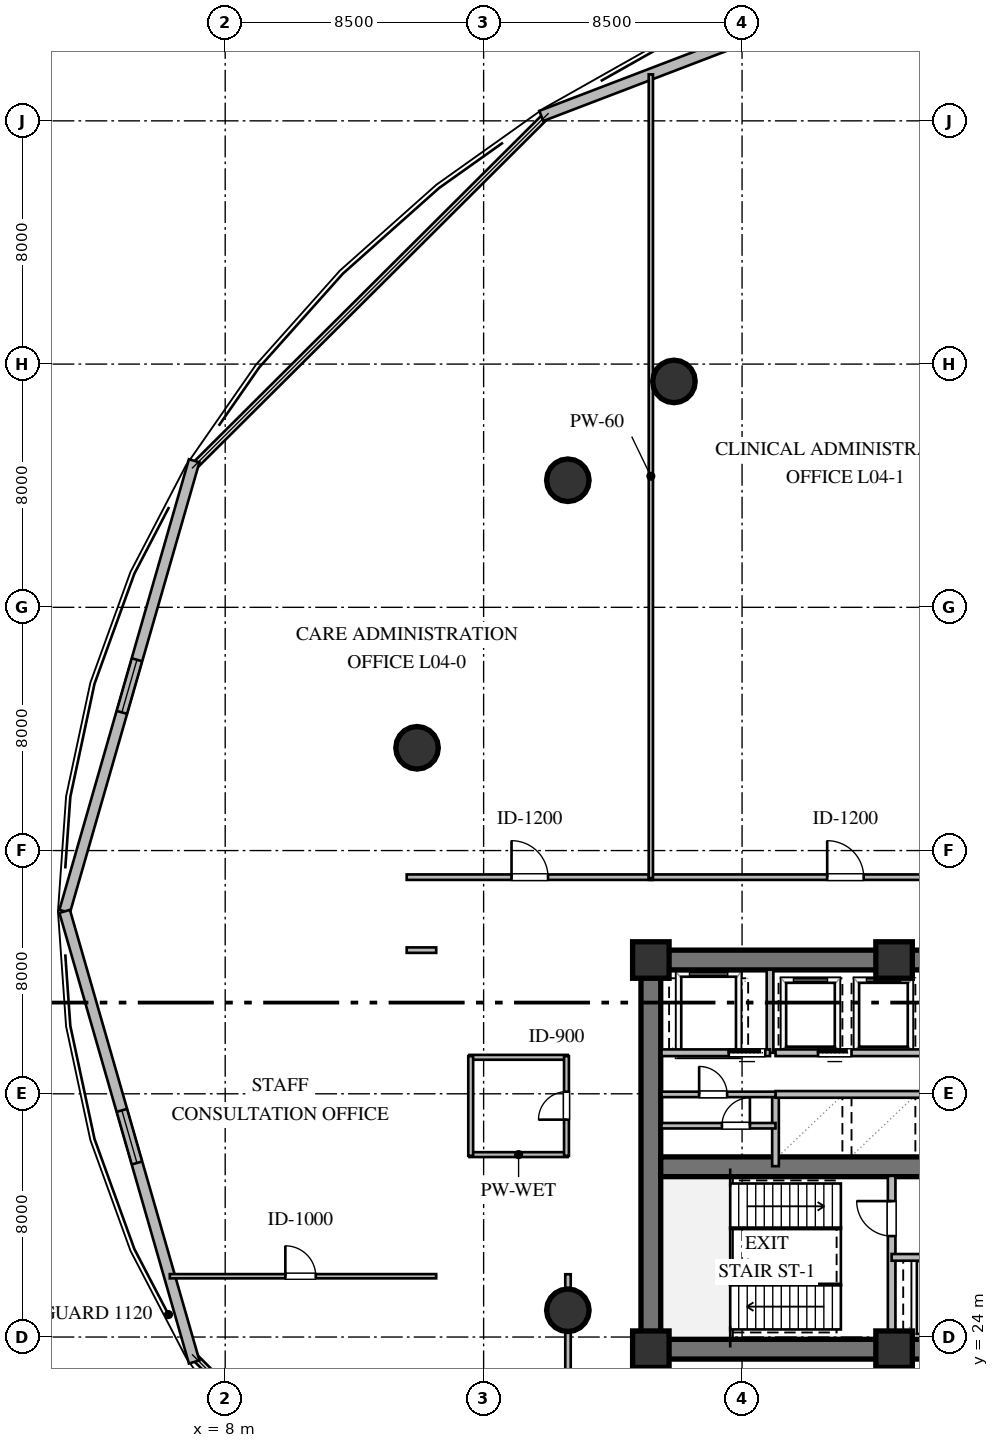
"""IFC4 building model, lengths in metres.
Left out: names, types, materials, properties, quantities, classifications, styles, units other than length and angle.
Written with IfcOpenShell. Run it as: python <this file> out.ifc"""

import sys

from ifc_helpers import new_model, si_unit, direction, frame, frame_2d, origin, origin_2d, place, context, subcontext, project, spatial, rectangle, circle, extrude, element, fill, save


model = new_model("IFC4")
c1 = context("Model", 3, precision=1e-05, world=origin(), true_north=direction((0.0, 1.0)))
c2 = subcontext(c1, "Body", "Model", "MODEL_VIEW")
j1 = project(units=[si_unit("LENGTHUNIT", "METRE"), si_unit("PLANEANGLEUNIT", "RADIAN")], contexts=[c1])
p1 = place(None, origin())
s1 = spatial("IfcSite", under=j1, at=p1, CompositionType="ELEMENT")
p2 = place(p1, origin())
s2 = spatial("IfcBuilding", under=s1, at=p2, CompositionType="ELEMENT")
p3 = place(p2, frame((0.0, 0.0, 19.2)))
s3 = spatial("IfcBuildingStorey", under=s2, at=p3, CompositionType="ELEMENT", Elevation=19.2)
for number, where, z_axis, x_axis in (
    (1, (21.675, 23.6, 0.0), (0.0, 0.0, 1.0), (1.0, 0.0, 0.0)),
    (2, (21.675, 36.4, 0.0), (0.0, 0.0, 1.0), (1.0, 0.0, 0.0)),
):
    element("IfcWall", number, at=place(p3, frame(where, z_axis=z_axis, x_axis=x_axis)), inside=s3, PredefinedType="SHEAR", context=c2, shape_type="SweptSolid", body=[
        extrude(rectangle(XDim=22.65, YDim=0.65, at=frame_2d((11.325, 0.0))), origin(), (0.0, 0.0, 1.0), 4.56),
    ])
p4 = place(p3, frame((22.0, 23.925, 0.0), z_axis=(0.0, 0.0, 1.0), x_axis=(0.0, 1.0, 0.0)))
e3 = element("IfcWall", 3, at=p4, inside=s3, PredefinedType="SHEAR", context=c2, shape_type="SweptSolid", body=[
    extrude(rectangle(XDim=12.15, YDim=0.65, at=frame_2d((6.075, 0.0))), origin(), (0.0, 0.0, 1.0), 4.56),
])
p5 = place(p3, frame((22.325, 29.6, 0.0), z_axis=(0.0, 0.0, 1.0), x_axis=(1.0, 0.0, 0.0)))
e4 = element("IfcWall", 4, at=p5, inside=s3, PredefinedType="SHEAR", context=c2, shape_type="SweptSolid", body=[
    extrude(rectangle(XDim=21.35, YDim=0.65, at=frame_2d((10.675, 0.0))), origin(), (0.0, 0.0, 1.0), 4.56),
])
p6 = place(p5, frame((12.125, 0.0, 0.0)))
e5 = element("IfcOpeningElement", 5, at=p6, cuts=e4, PredefinedType="OPENING", context=c2, shape_type="SweptSolid", body=[
    extrude(rectangle(XDim=1.15, YDim=2.1, at=frame_2d((0.575, 1.05))), frame((0.0, 0.335, 0.0), z_axis=(0.0, -1.0, 0.0), x_axis=(1.0, 0.0, 0.0)), (0.0, 0.0, 1.0), 0.67),
])
for number, where, z_axis, x_axis in (
    (6, (22.0, 23.6, 0.0), (0.0, 0.0, 1.0), (1.0, 0.0, 0.0)),
    (7, (30.0, 23.6, 0.0), (0.0, 0.0, 1.0), (1.0, 0.0, 0.0)),
    (8, (30.0, 36.4, 0.0), (0.0, 0.0, 1.0), (1.0, 0.0, 0.0)),
    (9, (22.0, 36.4, 0.0), (0.0, 0.0, 1.0), (1.0, 0.0, 0.0)),
):
    element("IfcColumn", number, at=place(p3, frame(where, z_axis=z_axis, x_axis=x_axis)), inside=s3, PredefinedType="COLUMN", context=c2, shape_type="SweptSolid", body=[
        extrude(rectangle(XDim=1.2, YDim=1.2, at=origin_2d()), origin(), (0.0, 0.0, 1.0), 4.8),
    ])
for number, where, z_axis, x_axis in (
    (10, (22.76, 55.43, 0.0), (0.0, 0.0, 1.0), (1.0, 0.0, 0.0)),
    (11, (19.27, 52.18, 0.0), (0.0, 0.0, 1.0), (1.0, 0.0, 0.0)),
    (12, (14.31, 43.38, 0.0), (0.0, 0.0, 1.0), (1.0, 0.0, 0.0)),
    (13, (19.27, 24.88, 0.0), (0.0, 0.0, 1.0), (1.0, 0.0, 0.0)),
):
    element("IfcColumn", number, at=place(p3, frame(where, z_axis=z_axis, x_axis=x_axis)), inside=s3, PredefinedType="COLUMN", context=c2, shape_type="SweptSolid", body=[
        extrude(circle(Radius=0.7, at=origin_2d()), origin(), (0.0, 0.0, 1.0), 4.8),
    ])
p7 = place(p3, frame((35.835, 70.831, 0.0), z_axis=(0.0, 0.0, 1.0), x_axis=(-0.934010262022, -0.357246176238, 0.0)))
e14 = element("IfcWall", 14, at=p7, inside=s3, PredefinedType="STANDARD", context=c2, shape_type="SweptSolid", body=[
    extrude(rectangle(XDim=18.671, YDim=0.36, at=frame_2d((9.335, 0.0))), origin(), (0.0, 0.0, 1.0), 4.56),
])
p8 = place(p7, frame((8.436, 0.0, 1.05)))
e15 = element("IfcOpeningElement", 15, at=p8, cuts=e14, PredefinedType="OPENING", context=c2, shape_type="SweptSolid", body=[
    extrude(rectangle(XDim=1.8, YDim=1.7, at=frame_2d((0.9, 0.85))), frame((0.0, 0.19, 0.0), z_axis=(0.0, -1.0, 0.0), x_axis=(1.0, 0.0, 0.0)), (0.0, 0.0, 1.0), 0.38),
])
p9 = place(p3, frame((6.979, 52.82, 0.0), z_axis=(0.0, 0.0, 1.0), x_axis=(-0.276203409751, -0.961099202186, 0.0)))
e16 = element("IfcWall", 16, at=p9, inside=s3, PredefinedType="STANDARD", context=c2, shape_type="SweptSolid", body=[
    extrude(rectangle(XDim=15.42, YDim=0.36, at=frame_2d((7.71, 0.0))), origin(), (0.0, 0.0, 1.0), 4.56),
])
p10 = place(p9, frame((6.81, 0.0, 1.05)))
e17 = element("IfcOpeningElement", 17, at=p10, cuts=e16, PredefinedType="OPENING", context=c2, shape_type="SweptSolid", body=[
    extrude(rectangle(XDim=1.8, YDim=1.7, at=frame_2d((0.9, 0.85))), frame((0.0, 0.19, 0.0), z_axis=(0.0, -1.0, 0.0), x_axis=(1.0, 0.0, 0.0)), (0.0, 0.0, 1.0), 0.38),
])
p11 = place(p3, frame((2.72, 38.0, 0.0), z_axis=(0.0, 0.0, 1.0), x_axis=(0.276203409751, -0.961099202186, 0.0)))
e18 = element("IfcWall", 18, at=p11, inside=s3, PredefinedType="STANDARD", context=c2, shape_type="SweptSolid", body=[
    extrude(rectangle(XDim=15.42, YDim=0.36, at=frame_2d((7.71, 0.0))), origin(), (0.0, 0.0, 1.0), 4.56),
])
p12 = place(p11, frame((6.81, 0.0, 1.05)))
e19 = element("IfcOpeningElement", 19, at=p12, cuts=e18, PredefinedType="OPENING", context=c2, shape_type="SweptSolid", body=[
    extrude(rectangle(XDim=1.8, YDim=1.7, at=frame_2d((0.9, 0.85))), frame((0.0, 0.19, 0.0), z_axis=(0.0, -1.0, 0.0), x_axis=(1.0, 0.0, 0.0)), (0.0, 0.0, 1.0), 0.38),
])
p13 = place(p3, frame((29.92, 23.9, 0.0), z_axis=(0.0, 0.0, 1.0), x_axis=(0.0, 1.0, 0.0)))
e20 = element("IfcWall", 20, at=p13, inside=s3, PredefinedType="SOLIDWALL", context=c2, shape_type="SweptSolid", body=[
    extrude(rectangle(XDim=5.4, YDim=0.25, at=frame_2d((2.7, 0.0))), origin(), (0.0, 0.0, 1.0), 4.56),
])
p14 = place(p13, frame((3.421, 0.0, 0.0)))
e21 = element("IfcOpeningElement", 21, at=p14, cuts=e20, PredefinedType="OPENING", context=c2, shape_type="SweptSolid", body=[
    extrude(rectangle(XDim=1.15, YDim=2.1, at=frame_2d((0.575, 1.05))), frame((0.0, 0.135, 0.0), z_axis=(0.0, -1.0, 0.0), x_axis=(1.0, 0.0, 0.0)), (0.0, 0.0, 1.0), 0.27),
])
p15 = place(p3, frame((29.92, 26.62, 0.0), z_axis=(0.0, 0.0, 1.0), x_axis=(1.0, 0.0, 0.0)))
e22 = element("IfcWall", 22, at=p15, inside=s3, PredefinedType="SOLIDWALL", context=c2, shape_type="SweptSolid", body=[
    extrude(rectangle(XDim=6.16, YDim=0.22, at=frame_2d((3.08, 0.0))), origin(), (0.0, 0.0, 1.0), 4.56),
])
p16 = place(p15, frame((0.99, 0.0, 0.0)))
e23 = element("IfcOpeningElement", 23, at=p16, cuts=e22, PredefinedType="OPENING", context=c2, shape_type="SweptSolid", body=[
    extrude(rectangle(XDim=1.1, YDim=2.1, at=frame_2d((0.55, 1.05))), frame((0.0, 0.12, 0.0), z_axis=(0.0, -1.0, 0.0), x_axis=(1.0, 0.0, 0.0)), (0.0, 0.0, 1.0), 0.24),
])
p17 = place(p15, frame((4.07, 0.0, 0.0)))
e24 = element("IfcOpeningElement", 24, at=p17, cuts=e22, PredefinedType="OPENING", context=c2, shape_type="SweptSolid", body=[
    extrude(rectangle(XDim=1.1, YDim=2.1, at=frame_2d((0.55, 1.05))), frame((0.0, 0.12, 0.0), z_axis=(0.0, -1.0, 0.0), x_axis=(1.0, 0.0, 0.0)), (0.0, 0.0, 1.0), 0.24),
])
p18 = place(p3, frame((25.92, 33.35, 0.0), z_axis=(0.0, 0.0, 1.0), x_axis=(0.0, 1.0, 0.0)))
e25 = element("IfcWall", 25, at=p18, inside=s3, PredefinedType="SOLIDWALL", context=c2, shape_type="SweptSolid", body=[
    extrude(rectangle(XDim=2.73, YDim=0.22, at=frame_2d((1.365, 0.0))), origin(), (0.0, 0.0, 1.0), 4.56),
])
p19 = place(p3, frame((22.35, 33.35, 0.0), z_axis=(0.0, 0.0, 1.0), x_axis=(1.0, 0.0, 0.0)))
e26 = element("IfcWall", 26, at=p19, inside=s3, PredefinedType="SOLIDWALL", context=c2, shape_type="SweptSolid", body=[
    extrude(rectangle(XDim=3.57, YDim=0.22, at=frame_2d((1.785, 0.0))), origin(), (0.0, 0.0, 1.0), 4.56),
])
p20 = place(p19, frame((2.213, 0.0, 0.0)))
e27 = element("IfcOpeningElement", 27, at=p20, cuts=e26, PredefinedType="OPENING", context=c2, shape_type="SweptSolid", body=[
    extrude(rectangle(XDim=1.2, YDim=2.1, at=frame_2d((0.6, 1.05))), frame((0.0, 0.12, 0.0), z_axis=(0.0, -1.0, 0.0), x_axis=(1.0, 0.0, 0.0)), (0.0, 0.0, 1.0), 0.24),
])
p21 = place(p3, frame((26.1, 29.62, 0.0), z_axis=(0.0, 0.0, 1.0), x_axis=(0.0, 1.0, 0.0)))
e28 = element("IfcWall", 28, at=p21, inside=s3, PredefinedType="SOLIDWALL", context=c2, shape_type="SweptSolid", body=[
    extrude(rectangle(XDim=2.36, YDim=0.22, at=frame_2d((1.18, 0.0))), origin(), (0.0, 0.0, 1.0), 4.56),
])
p22 = place(p3, frame((26.1, 31.98, 0.0), z_axis=(0.0, 0.0, 1.0), x_axis=(1.0, 0.0, 0.0)))
e29 = element("IfcWall", 29, at=p22, inside=s3, PredefinedType="SOLIDWALL", context=c2, shape_type="SweptSolid", body=[
    extrude(rectangle(XDim=7.8, YDim=0.22, at=frame_2d((3.9, 0.0))), origin(), (0.0, 0.0, 1.0), 4.56),
])
p23 = place(p3, frame((26.1, 33.35, 0.0), z_axis=(0.0, 0.0, 1.0), x_axis=(1.0, 0.0, 0.0)))
e30 = element("IfcWall", 30, at=p23, inside=s3, PredefinedType="SOLIDWALL", context=c2, shape_type="SweptSolid", body=[
    extrude(rectangle(XDim=7.8, YDim=0.22, at=frame_2d((3.9, 0.0))), origin(), (0.0, 0.0, 1.0), 4.56),
])
p24 = place(p23, frame((1.4, 0.0, 0.0)))
e31 = element("IfcOpeningElement", 31, at=p24, cuts=e30, PredefinedType="OPENING", context=c2, shape_type="SweptSolid", body=[
    extrude(rectangle(XDim=1.1, YDim=2.1, at=frame_2d((0.55, 1.05))), frame((0.0, 0.12, 0.0), z_axis=(0.0, -1.0, 0.0), x_axis=(1.0, 0.0, 0.0)), (0.0, 0.0, 1.0), 0.24),
])
p25 = place(p23, frame((5.066, 0.0, 0.0)))
e32 = element("IfcOpeningElement", 32, at=p25, cuts=e30, PredefinedType="OPENING", context=c2, shape_type="SweptSolid", body=[
    extrude(rectangle(XDim=1.1, YDim=2.1, at=frame_2d((0.55, 1.05))), frame((0.0, 0.12, 0.0), z_axis=(0.0, -1.0, 0.0), x_axis=(1.0, 0.0, 0.0)), (0.0, 0.0, 1.0), 0.24),
])
p26 = place(p3, frame((22.35, 30.95, 0.0), z_axis=(0.0, 0.0, 1.0), x_axis=(1.0, 0.0, 0.0)))
e33 = element("IfcWall", 33, at=p26, inside=s3, PredefinedType="PARTITIONING", context=c2, shape_type="SweptSolid", body=[
    extrude(rectangle(XDim=3.75, YDim=0.18, at=frame_2d((1.875, 0.0))), origin(), (0.0, 0.0, 1.0), 4.56),
])
p27 = place(p26, frame((1.988, 0.0, 0.0)))
e34 = element("IfcOpeningElement", 34, at=p27, cuts=e33, PredefinedType="OPENING", context=c2, shape_type="SweptSolid", body=[
    extrude(rectangle(XDim=0.92, YDim=2.1, at=frame_2d((0.46, 1.05))), frame((0.0, 0.1, 0.0), z_axis=(0.0, -1.0, 0.0), x_axis=(1.0, 0.0, 0.0)), (0.0, 0.0, 1.0), 0.2),
])
p28 = place(p3, frame((22.35, 31.98, 0.0), z_axis=(0.0, 0.0, 1.0), x_axis=(1.0, 0.0, 0.0)))
e35 = element("IfcWall", 35, at=p28, inside=s3, PredefinedType="PARTITIONING", context=c2, shape_type="SweptSolid", body=[
    extrude(rectangle(XDim=3.75, YDim=0.18, at=frame_2d((1.875, 0.0))), origin(), (0.0, 0.0, 1.0), 4.56),
])
p29 = place(p28, frame((1.238, 0.0, 0.0)))
e36 = element("IfcOpeningElement", 36, at=p29, cuts=e35, PredefinedType="OPENING", context=c2, shape_type="SweptSolid", body=[
    extrude(rectangle(XDim=0.92, YDim=2.1, at=frame_2d((0.46, 1.05))), frame((0.0, 0.1, 0.0), z_axis=(0.0, -1.0, 0.0), x_axis=(1.0, 0.0, 0.0)), (0.0, 0.0, 1.0), 0.2),
])
for number, where, z_axis, x_axis in (
    (37, (16.035, 30.0, 0.0), (0.0, 0.0, 1.0), (1.0, 0.0, 0.0)),
    (38, (16.035, 33.2, 0.0), (0.0, 0.0, 1.0), (1.0, 0.0, 0.0)),
):
    element("IfcWall", number, at=place(p3, frame(where, z_axis=z_axis, x_axis=x_axis)), inside=s3, PredefinedType="PLUMBINGWALL", context=c2, shape_type="SweptSolid", body=[
        extrude(rectangle(XDim=3.23, YDim=0.16, at=frame_2d((1.615, 0.0))), origin(), (0.0, 0.0, 1.0), 4.56),
    ])
p30 = place(p3, frame((16.075, 29.96, 0.0), z_axis=(0.0, 0.0, 1.0), x_axis=(0.0, 1.0, 0.0)))
e39 = element("IfcWall", 39, at=p30, inside=s3, PredefinedType="PLUMBINGWALL", context=c2, shape_type="SweptSolid", body=[
    extrude(rectangle(XDim=3.28, YDim=0.16, at=frame_2d((1.64, 0.0))), origin(), (0.0, 0.0, 1.0), 4.56),
])
p31 = place(p3, frame((19.225, 29.96, 0.0), z_axis=(0.0, 0.0, 1.0), x_axis=(0.0, 1.0, 0.0)))
e40 = element("IfcWall", 40, at=p31, inside=s3, PredefinedType="PLUMBINGWALL", context=c2, shape_type="SweptSolid", body=[
    extrude(rectangle(XDim=3.28, YDim=0.16, at=frame_2d((1.64, 0.0))), origin(), (0.0, 0.0, 1.0), 4.56),
])
p32 = place(p31, frame((1.19, 0.0, 0.0)))
e41 = element("IfcOpeningElement", 41, at=p32, cuts=e40, PredefinedType="OPENING", context=c2, shape_type="SweptSolid", body=[
    extrude(rectangle(XDim=0.92, YDim=2.1, at=frame_2d((0.46, 1.05))), frame((0.0, 0.09, 0.0), z_axis=(0.0, -1.0, 0.0), x_axis=(1.0, 0.0, 0.0)), (0.0, 0.0, 1.0), 0.18),
])
p33 = place(p3, frame((13.97, 39.125, 0.0), z_axis=(0.0, 0.0, 1.0), x_axis=(1.0, 0.0, 0.0)))
e42 = element("IfcWall", 42, at=p33, inside=s3, PredefinedType="PARTITIONING", context=c2, shape_type="SweptSolid", body=[
    extrude(rectangle(XDim=8.095, YDim=0.18, at=frame_2d((4.047, 0.0))), origin(), (0.0, 0.0, 1.0), 4.56),
])
p34 = place(p33, frame((3.448, 0.0, 0.0)))
e43 = element("IfcOpeningElement", 43, at=p34, cuts=e42, PredefinedType="OPENING", context=c2, shape_type="SweptSolid", body=[
    extrude(rectangle(XDim=1.2, YDim=2.15, at=frame_2d((0.6, 1.075))), frame((0.0, 0.1, 0.0), z_axis=(0.0, -1.0, 0.0), x_axis=(1.0, 0.0, 0.0)), (0.0, 0.0, 1.0), 0.2),
])
p35 = place(p3, frame((21.935, 39.125, 0.0), z_axis=(0.0, 0.0, 1.0), x_axis=(1.0, 0.0, 0.0)))
e44 = element("IfcWall", 44, at=p35, inside=s3, PredefinedType="PARTITIONING", context=c2, shape_type="SweptSolid", body=[
    extrude(rectangle(XDim=12.93, YDim=0.18, at=frame_2d((6.465, 0.0))), origin(), (0.0, 0.0, 1.0), 4.56),
])
p36 = place(p35, frame((5.865, 0.0, 0.0)))
e45 = element("IfcOpeningElement", 45, at=p36, cuts=e44, PredefinedType="OPENING", context=c2, shape_type="SweptSolid", body=[
    extrude(rectangle(XDim=1.2, YDim=2.15, at=frame_2d((0.6, 1.075))), frame((0.0, 0.1, 0.0), z_axis=(0.0, -1.0, 0.0), x_axis=(1.0, 0.0, 0.0)), (0.0, 0.0, 1.0), 0.2),
])
p37 = place(p3, frame((19.275, 19.97, 0.0), z_axis=(0.0, 0.0, 1.0), x_axis=(0.0, 1.0, 0.0)))
e46 = element("IfcWall", 46, at=p37, inside=s3, PredefinedType="PARTITIONING", context=c2, shape_type="SweptSolid", body=[
    extrude(rectangle(XDim=6.095, YDim=0.18, at=frame_2d((3.047, 0.0))), origin(), (0.0, 0.0, 1.0), 3.938),
])
p38 = place(p37, frame((1.647, 0.0, 0.0)))
e47 = element("IfcOpeningElement", 47, at=p38, cuts=e46, PredefinedType="OPENING", context=c2, shape_type="SweptSolid", body=[
    extrude(rectangle(XDim=1.2, YDim=2.15, at=frame_2d((0.6, 1.075))), frame((0.0, 0.1, 0.0), z_axis=(0.0, -1.0, 0.0), x_axis=(1.0, 0.0, 0.0)), (0.0, 0.0, 1.0), 0.2),
])
p39 = place(p3, frame((21.675, 23.59, 0.0), z_axis=(0.0, 0.0, 1.0), x_axis=(0.0, -1.0, 0.0)))
e48 = element("IfcWall", 48, at=p39, inside=s3, PredefinedType="PARTITIONING", context=c2, shape_type="SweptSolid", body=[
    extrude(rectangle(XDim=3.62, YDim=0.18, at=frame_2d((1.81, 0.0))), origin(), (0.0, 0.0, 1.0), 3.7),
])
p40 = place(p3, frame((14.94, 36.725, 0.0), z_axis=(0.0, 0.0, 1.0), x_axis=(-1.0, 0.0, 0.0)))
e49 = element("IfcWall", 49, at=p40, inside=s3, PredefinedType="PARTITIONING", context=c2, shape_type="SweptSolid", body=[
    extrude(rectangle(XDim=0.97, YDim=0.18, at=frame_2d((0.485, 0.0))), origin(), (0.0, 0.0, 1.0), 4.56),
])
p41 = place(p3, frame((22.0, 65.529, 0.0), z_axis=(0.0, 0.0, 1.0), x_axis=(0.0, -1.0, 0.0)))
e50 = element("IfcWall", 50, at=p41, inside=s3, PredefinedType="PARTITIONING", context=c2, shape_type="SweptSolid", body=[
    extrude(rectangle(XDim=26.434, YDim=0.14, at=frame_2d((13.217, 0.0))), origin(), (0.0, 0.0, 1.0), 4.006),
])
p42 = place(p3, frame((6.179, 26.0, 0.0), z_axis=(0.0, 0.0, 1.0), x_axis=(1.0, 0.0, 0.0)))
e51 = element("IfcWall", 51, at=p42, inside=s3, PredefinedType="PARTITIONING", context=c2, shape_type="SweptSolid", body=[
    extrude(rectangle(XDim=8.761, YDim=0.14, at=frame_2d((4.381, 0.0))), origin(), (0.0, 0.0, 1.0), 4.56),
])
p43 = place(p42, frame((3.8, 0.0, 0.0)))
e52 = element("IfcOpeningElement", 52, at=p43, cuts=e51, PredefinedType="OPENING", context=c2, shape_type="SweptSolid", body=[
    extrude(rectangle(XDim=1.0, YDim=2.1, at=frame_2d((0.5, 1.05))), frame((0.0, 0.08, 0.0), z_axis=(0.0, -1.0, 0.0), x_axis=(1.0, 0.0, 0.0)), (0.0, 0.0, 1.0), 0.16),
])
p44 = place(p10, origin())
e53 = element("IfcWindow", 53, at=p44, inside=s3, PartitioningType="SINGLE_PANEL", PredefinedType="WINDOW", context=c2, shape_type="SweptSolid", body=[
    extrude(rectangle(XDim=1.8, YDim=1.7, at=frame_2d((0.9, 0.85))), frame((0.0, 0.03, 0.0), z_axis=(0.0, -1.0, 0.0), x_axis=(1.0, 0.0, 0.0)), (0.0, 0.0, 1.0), 0.06),
])
fill(e17, e53)
p45 = place(p12, origin())
e54 = element("IfcWindow", 54, at=p45, inside=s3, PartitioningType="SINGLE_PANEL", PredefinedType="WINDOW", context=c2, shape_type="SweptSolid", body=[
    extrude(rectangle(XDim=1.8, YDim=1.7, at=frame_2d((0.9, 0.85))), frame((0.0, 0.03, 0.0), z_axis=(0.0, -1.0, 0.0), x_axis=(1.0, 0.0, 0.0)), (0.0, 0.0, 1.0), 0.06),
])
fill(e19, e54)
p46 = place(p14, origin())
e55 = element("IfcDoor", 55, at=p46, inside=s3, OperationType="SINGLE_SWING_RIGHT", PredefinedType="DOOR", context=c2, shape_type="SweptSolid", body=[
    extrude(rectangle(XDim=1.15, YDim=2.1, at=frame_2d((0.575, 1.05))), frame((0.0, 0.025, 0.0), z_axis=(0.0, -1.0, 0.0), x_axis=(1.0, 0.0, 0.0)), (0.0, 0.0, 1.0), 0.05),
])
fill(e21, e55)
p47 = place(p20, origin())
e56 = element("IfcDoor", 56, at=p47, inside=s3, OperationType="SLIDING_TO_LEFT", PredefinedType="DOOR", context=c2, shape_type="SweptSolid", body=[
    extrude(rectangle(XDim=1.2, YDim=2.1, at=frame_2d((0.6, 1.05))), frame((0.0, 0.025, 0.0), z_axis=(0.0, -1.0, 0.0), x_axis=(1.0, 0.0, 0.0)), (0.0, 0.0, 1.0), 0.05),
])
fill(e27, e56)
p48 = place(p24, origin())
e57 = element("IfcDoor", 57, at=p48, inside=s3, OperationType="SLIDING_TO_LEFT", PredefinedType="DOOR", context=c2, shape_type="SweptSolid", body=[
    extrude(rectangle(XDim=1.1, YDim=2.1, at=frame_2d((0.55, 1.05))), frame((0.0, 0.025, 0.0), z_axis=(0.0, -1.0, 0.0), x_axis=(1.0, 0.0, 0.0)), (0.0, 0.0, 1.0), 0.05),
])
fill(e31, e57)
p49 = place(p29, origin())
e58 = element("IfcDoor", 58, at=p49, inside=s3, OperationType="SINGLE_SWING_LEFT", PredefinedType="DOOR", context=c2, shape_type="SweptSolid", body=[
    extrude(rectangle(XDim=0.92, YDim=2.1, at=frame_2d((0.46, 1.05))), frame((0.0, 0.025, 0.0), z_axis=(0.0, -1.0, 0.0), x_axis=(1.0, 0.0, 0.0)), (0.0, 0.0, 1.0), 0.05),
])
fill(e36, e58)
p50 = place(p27, origin())
e59 = element("IfcDoor", 59, at=p50, inside=s3, OperationType="SINGLE_SWING_RIGHT", PredefinedType="DOOR", context=c2, shape_type="SweptSolid", body=[
    extrude(rectangle(XDim=0.92, YDim=2.1, at=frame_2d((0.46, 1.05))), frame((0.0, 0.025, 0.0), z_axis=(0.0, -1.0, 0.0), x_axis=(1.0, 0.0, 0.0)), (0.0, 0.0, 1.0), 0.05),
])
fill(e34, e59)
p51 = place(p32, origin())
e60 = element("IfcDoor", 60, at=p51, inside=s3, OperationType="SINGLE_SWING_LEFT", PredefinedType="DOOR", context=c2, shape_type="SweptSolid", body=[
    extrude(rectangle(XDim=0.92, YDim=2.1, at=frame_2d((0.46, 1.05))), frame((0.0, 0.025, 0.0), z_axis=(0.0, -1.0, 0.0), x_axis=(1.0, 0.0, 0.0)), (0.0, 0.0, 1.0), 0.05),
])
fill(e41, e60)
p52 = place(p34, origin())
e61 = element("IfcDoor", 61, at=p52, inside=s3, OperationType="SINGLE_SWING_LEFT", PredefinedType="DOOR", context=c2, shape_type="SweptSolid", body=[
    extrude(rectangle(XDim=1.2, YDim=2.15, at=frame_2d((0.6, 1.075))), frame((0.0, 0.025, 0.0), z_axis=(0.0, -1.0, 0.0), x_axis=(1.0, 0.0, 0.0)), (0.0, 0.0, 1.0), 0.05),
])
fill(e43, e61)
p53 = place(p36, origin())
e62 = element("IfcDoor", 62, at=p53, inside=s3, OperationType="SINGLE_SWING_LEFT", PredefinedType="DOOR", context=c2, shape_type="SweptSolid", body=[
    extrude(rectangle(XDim=1.2, YDim=2.15, at=frame_2d((0.6, 1.075))), frame((0.0, 0.025, 0.0), z_axis=(0.0, -1.0, 0.0), x_axis=(1.0, 0.0, 0.0)), (0.0, 0.0, 1.0), 0.05),
])
fill(e45, e62)
p54 = place(p43, origin())
e63 = element("IfcDoor", 63, at=p54, inside=s3, OperationType="SINGLE_SWING_LEFT", PredefinedType="DOOR", context=c2, shape_type="SweptSolid", body=[
    extrude(rectangle(XDim=1.0, YDim=2.1, at=frame_2d((0.5, 1.05))), frame((0.0, 0.025, 0.0), z_axis=(0.0, -1.0, 0.0), x_axis=(1.0, 0.0, 0.0)), (0.0, 0.0, 1.0), 0.05),
])
fill(e52, e63)
save(model, sys.argv[1])
